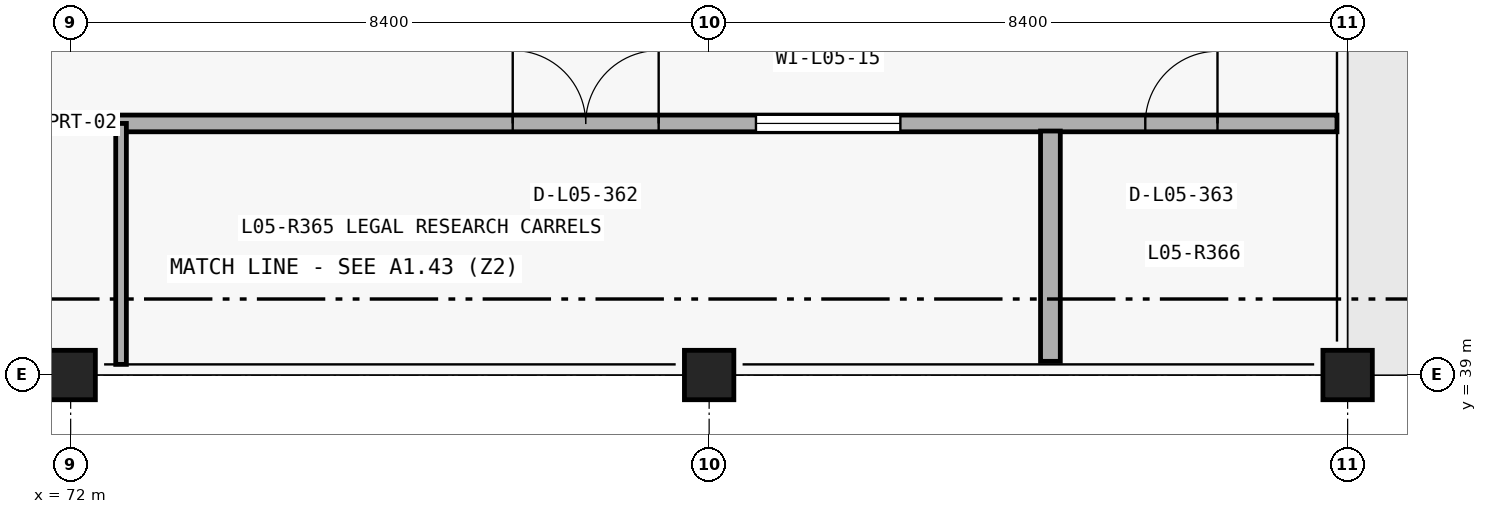
"""IFC4 building model, lengths in metres.
Left out: names, types, materials, properties, quantities, classifications, styles, units other than length and angle.
Written with IfcOpenShell. Run it as: python <this file> out.ifc"""

import sys

from ifc_helpers import new_model, si_unit, direction, frame, frame_2d, origin_with_axes, origin_2d_with_axis, place, context, subcontext, project, spatial, rectangle, circle, extrude, element, fill, save


model = new_model("IFC4")
c1 = context("Model", 3, precision=1e-05, world=origin_with_axes(), true_north=direction((0.0, 1.0)))
c2 = subcontext(c1, "Body", "Model", "MODEL_VIEW")
j1 = project(units=[si_unit("LENGTHUNIT", "METRE"), si_unit("PLANEANGLEUNIT", "RADIAN")], contexts=[c1])
p1 = place(None, origin_with_axes())
s1 = spatial("IfcSite", under=j1, at=p1, CompositionType="ELEMENT")
p2 = place(p1, origin_with_axes())
s2 = spatial("IfcBuilding", under=s1, at=p2, CompositionType="ELEMENT")
p3 = place(p2, frame((0.0, 0.0, 24.9), z_axis=(0.0, 0.0, 1.0), x_axis=(1.0, 0.0, 0.0)))
s3 = spatial("IfcBuildingStorey", under=s2, at=p3, CompositionType="ELEMENT", Elevation=24.9)
p4 = place(None, frame((55.34, 42.31, 24.9), z_axis=(0.0, 0.0, 1.0), x_axis=(1.0, 0.0, 0.0)))
e1 = element("IfcWall", 1, at=p4, inside=s3, PredefinedType="PARTITIONING", context=c2, shape_type="SweptSolid", body=[
    extrude(rectangle(XDim=33.32, YDim=0.22, at=frame_2d((16.66, 0.0), x_axis=(1.0, 0.0))), origin_with_axes(), (0.0, 0.0, 1.0), 4.44),
])
p5 = place(None, frame((64.163, 42.31, 24.9), z_axis=(0.0, 0.0, 1.0), x_axis=(1.0, 0.0, 0.0)))
e2 = element("IfcOpeningElement", 2, at=p5, cuts=e1, PredefinedType="OPENING", context=c2, shape_type="SweptSolid", body=[
    extrude(rectangle(XDim=0.96, YDim=2.2, at=frame_2d((0.0, 1.1), x_axis=(1.0, 0.0))), frame((0.0, 0.12, 0.0), z_axis=(0.0, -1.0, 0.0), x_axis=(1.0, 0.0, 0.0)), (0.0, 0.0, 1.0), 0.24),
])
p6 = place(None, frame((78.776, 42.31, 24.9), z_axis=(0.0, 0.0, 1.0), x_axis=(1.0, 0.0, 0.0)))
e3 = element("IfcOpeningElement", 3, at=p6, cuts=e1, PredefinedType="OPENING", context=c2, shape_type="SweptSolid", body=[
    extrude(rectangle(XDim=1.92, YDim=2.64, at=frame_2d((0.0, 1.32), x_axis=(1.0, 0.0))), frame((0.0, 0.12, 0.0), z_axis=(0.0, -1.0, 0.0), x_axis=(1.0, 0.0, 0.0)), (0.0, 0.0, 1.0), 0.24),
])
p7 = place(None, frame((86.613, 42.31, 24.9), z_axis=(0.0, 0.0, 1.0), x_axis=(1.0, 0.0, 0.0)))
e4 = element("IfcOpeningElement", 4, at=p7, cuts=e1, PredefinedType="OPENING", context=c2, shape_type="SweptSolid", body=[
    extrude(rectangle(XDim=0.95, YDim=2.1, at=frame_2d((0.0, 1.05), x_axis=(1.0, 0.0))), frame((0.0, 0.12, 0.0), z_axis=(0.0, -1.0, 0.0), x_axis=(1.0, 0.0, 0.0)), (0.0, 0.0, 1.0), 0.24),
])
p8 = place(None, frame((81.966, 42.31, 25.95), z_axis=(0.0, 0.0, 1.0), x_axis=(1.0, 0.0, 0.0)))
e5 = element("IfcOpeningElement", 5, at=p8, cuts=e1, PredefinedType="OPENING", context=c2, shape_type="SweptSolid", body=[
    extrude(rectangle(XDim=1.9, YDim=1.5, at=frame_2d((0.0, 0.75), x_axis=(1.0, 0.0))), frame((0.0, 0.12, 0.0), z_axis=(0.0, -1.0, 0.0), x_axis=(1.0, 0.0, 0.0)), (0.0, 0.0, 1.0), 0.24),
])
p9 = place(None, frame((84.89, 39.18, 24.9), z_axis=(0.0, 0.0, 1.0), x_axis=(0.0, 1.0, 0.0)))
e6 = element("IfcWall", 6, at=p9, inside=s3, PredefinedType="PLUMBINGWALL", context=c2, shape_type="SweptSolid", body=[
    extrude(rectangle(XDim=3.03, YDim=0.26, at=frame_2d((1.515, 0.0), x_axis=(1.0, 0.0))), origin_with_axes(), (0.0, 0.0, 1.0), 4.44),
])
p10 = place(None, frame((72.663, 39.14, 24.9), z_axis=(0.0, 0.0, 1.0), x_axis=(0.0, 1.0, 0.0)))
e7 = element("IfcWall", 7, at=p10, inside=s3, PredefinedType="PARTITIONING", context=c2, shape_type="SweptSolid", body=[
    extrude(rectangle(XDim=3.17, YDim=0.14, at=frame_2d((1.585, 0.0), x_axis=(1.0, 0.0))), origin_with_axes(), (0.0, 0.0, 1.0), 4.44),
])
for number, where, z_axis, x_axis in (
    (8, (72.0, 39.0, 24.9), (0.0, 0.0, 1.0), (1.0, 0.0, 0.0)),
    (9, (80.4, 39.0, 24.9), (0.0, 0.0, 1.0), (1.0, 0.0, 0.0)),
    (10, (88.8, 39.0, 24.9), (0.0, 0.0, 1.0), (1.0, 0.0, 0.0)),
):
    element("IfcColumn", number, at=place(None, frame(where, z_axis=z_axis, x_axis=x_axis)), inside=s3, PredefinedType="COLUMN", context=c2, shape_type="SweptSolid", body=[
        extrude(circle(Radius=0.325, at=origin_2d_with_axis()), origin_with_axes(), (0.0, 0.0, 1.0), 4.8),
    ])
p11 = place(None, frame((78.776, 42.31, 24.9), z_axis=(0.0, 0.0, 1.0), x_axis=(1.0, 0.0, 0.0)))
e11 = element("IfcDoor", 11, at=p11, inside=s3, OperationType="DOUBLE_DOOR_SINGLE_SWING", PredefinedType="DOOR", context=c2, shape_type="SweptSolid", body=[
    extrude(rectangle(XDim=1.92, YDim=2.64, at=frame_2d((0.0, 1.32), x_axis=(1.0, 0.0))), frame((0.0, 0.04, 0.0), z_axis=(0.0, -1.0, 0.0), x_axis=(1.0, 0.0, 0.0)), (0.0, 0.0, 1.0), 0.08),
])
fill(e3, e11)
p12 = place(None, frame((86.613, 42.31, 24.9), z_axis=(0.0, 0.0, 1.0), x_axis=(1.0, 0.0, 0.0)))
e12 = element("IfcDoor", 12, at=p12, inside=s3, OperationType="SINGLE_SWING_RIGHT", PredefinedType="DOOR", context=c2, shape_type="SweptSolid", body=[
    extrude(rectangle(XDim=0.95, YDim=2.1, at=frame_2d((0.0, 1.05), x_axis=(1.0, 0.0))), frame((0.0, 0.04, 0.0), z_axis=(0.0, -1.0, 0.0), x_axis=(1.0, 0.0, 0.0)), (0.0, 0.0, 1.0), 0.08),
])
fill(e4, e12)
p13 = place(None, frame((81.966, 42.31, 25.95), z_axis=(0.0, 0.0, 1.0), x_axis=(1.0, 0.0, 0.0)))
e13 = element("IfcWindow", 13, at=p13, inside=s3, PartitioningType="SINGLE_PANEL", PredefinedType="WINDOW", context=c2, shape_type="SweptSolid", body=[
    extrude(rectangle(XDim=1.9, YDim=1.5, at=frame_2d((0.0, 0.75), x_axis=(1.0, 0.0))), frame((0.0, 0.03, 0.0), z_axis=(0.0, -1.0, 0.0), x_axis=(1.0, 0.0, 0.0)), (0.0, 0.0, 1.0), 0.06),
])
fill(e5, e13)
save(model, sys.argv[1])
